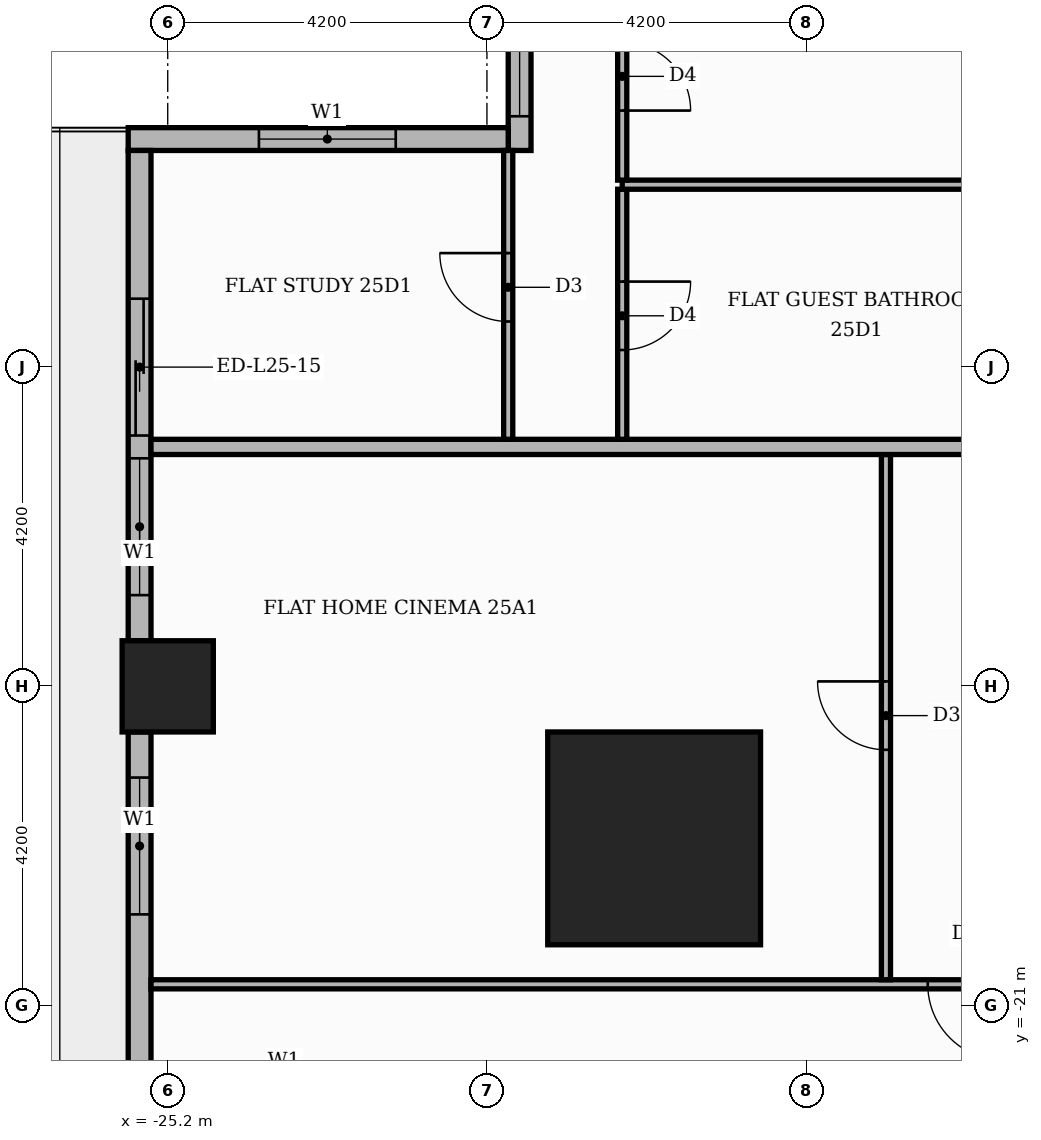
"""IFC4 building model, lengths in metres.
Left out: names, types, materials, properties, quantities, classifications, styles, units other than length and angle.
Written with IfcOpenShell. Run it as: python <this file> out.ifc"""

import sys

from ifc_helpers import new_model, si_unit, direction, frame, frame_2d, origin, origin_2d, place, context, subcontext, project, spatial, rectangle, extrude, element, fill, save


model = new_model("IFC4")
c1 = context("Model", 3, precision=1e-05, world=origin(), true_north=direction((0.0, 1.0)))
c2 = subcontext(c1, "Body", "Model", "MODEL_VIEW")
j1 = project(units=[si_unit("LENGTHUNIT", "METRE"), si_unit("PLANEANGLEUNIT", "RADIAN")], contexts=[c1])
p1 = place(None, origin())
s1 = spatial("IfcSite", under=j1, at=p1, CompositionType="ELEMENT")
p2 = place(p1, origin())
s2 = spatial("IfcBuilding", under=s1, at=p2, CompositionType="ELEMENT")
p3 = place(p2, frame((0.0, 0.0, 106.5)))
s3 = spatial("IfcBuildingStorey", under=s2, at=p3, CompositionType="ELEMENT", Elevation=106.5)
p4 = place(p3, frame((-18.8, -18.8, 0.0), z_axis=(0.0, 0.0, 1.0), x_axis=(1.0, 0.0, 0.0)))
e1 = element("IfcColumn", 1, at=p4, inside=s3, PredefinedType="COLUMN", context=c2, shape_type="SweptSolid", body=[
    extrude(rectangle(XDim=2.8, YDim=2.8, at=origin_2d()), origin(), (0.0, 0.0, 1.0), 3.9),
])
p5 = place(p3, frame((-25.2, -16.8, 0.0), z_axis=(0.0, 0.0, 1.0), x_axis=(1.0, 0.0, 0.0)))
e2 = element("IfcColumn", 2, at=p5, inside=s3, PredefinedType="COLUMN", context=c2, shape_type="SweptSolid", body=[
    extrude(rectangle(XDim=1.2, YDim=1.2, at=origin_2d()), origin(), (0.0, 0.0, 1.0), 3.9),
])
p6 = place(p3, frame((-20.57, 9.45, 0.0), z_axis=(0.0, 0.0, 1.0), x_axis=(0.0, -1.0, 0.0)))
e3 = element("IfcWall", 3, at=p6, inside=s3, PredefinedType="STANDARD", context=c2, shape_type="SweptSolid", body=[
    extrude(rectangle(XDim=19.2, YDim=0.3, at=frame_2d((9.6, 0.0))), origin(), (0.0, 0.0, 1.0), 3.48),
])
p7 = place(p6, frame((0.15, 0.0, 0.9)))
e4 = element("IfcOpeningElement", 4, at=p7, cuts=e3, PredefinedType="OPENING", context=c2, shape_type="SweptSolid", body=[
    extrude(rectangle(XDim=6.0, YDim=2.1, at=frame_2d((3.0, 1.05))), frame((0.0, 0.16, 0.0), z_axis=(0.0, -1.0, 0.0), x_axis=(1.0, 0.0, 0.0)), (0.0, 0.0, 1.0), 0.32),
])
p8 = place(p6, frame((6.45, 0.0, 0.9)))
e5 = element("IfcOpeningElement", 5, at=p8, cuts=e3, PredefinedType="OPENING", context=c2, shape_type="SweptSolid", body=[
    extrude(rectangle(XDim=6.0, YDim=2.1, at=frame_2d((3.0, 1.05))), frame((0.0, 0.16, 0.0), z_axis=(0.0, -1.0, 0.0), x_axis=(1.0, 0.0, 0.0)), (0.0, 0.0, 1.0), 0.32),
])
p9 = place(p6, frame((12.75, 0.0, 0.9)))
e6 = element("IfcOpeningElement", 6, at=p9, cuts=e3, PredefinedType="OPENING", context=c2, shape_type="SweptSolid", body=[
    extrude(rectangle(XDim=6.0, YDim=2.1, at=frame_2d((3.0, 1.05))), frame((0.0, 0.16, 0.0), z_axis=(0.0, -1.0, 0.0), x_axis=(1.0, 0.0, 0.0)), (0.0, 0.0, 1.0), 0.32),
])
p10 = place(p3, frame((-20.72, -9.6, 0.0), z_axis=(0.0, 0.0, 1.0), x_axis=(-1.0, 0.0, 0.0)))
e7 = element("IfcWall", 7, at=p10, inside=s3, PredefinedType="STANDARD", context=c2, shape_type="SweptSolid", body=[
    extrude(rectangle(XDim=5.0, YDim=0.3, at=frame_2d((2.5, 0.0))), origin(), (0.0, 0.0, 1.0), 3.48),
])
p11 = place(p10, frame((1.48, 0.0, 0.9)))
e8 = element("IfcOpeningElement", 8, at=p11, cuts=e7, PredefinedType="OPENING", context=c2, shape_type="SweptSolid", body=[
    extrude(rectangle(XDim=1.8, YDim=2.1, at=frame_2d((0.9, 1.05))), frame((0.0, 0.16, 0.0), z_axis=(0.0, -1.0, 0.0), x_axis=(1.0, 0.0, 0.0)), (0.0, 0.0, 1.0), 0.32),
])
p12 = place(p3, frame((-25.57, -9.75, 0.0), z_axis=(0.0, 0.0, 1.0), x_axis=(0.0, -1.0, 0.0)))
e9 = element("IfcWall", 9, at=p12, inside=s3, PredefinedType="STANDARD", context=c2, shape_type="SweptSolid", body=[
    extrude(rectangle(XDim=6.45, YDim=0.3, at=frame_2d((3.225, 0.0))), origin(), (0.0, 0.0, 1.0), 3.48),
])
p13 = place(p12, frame((1.95, 0.0, 0.0)))
e10 = element("IfcOpeningElement", 10, at=p13, cuts=e9, PredefinedType="OPENING", context=c2, shape_type="SweptSolid", body=[
    extrude(rectangle(XDim=1.8, YDim=2.4, at=frame_2d((0.9, 1.2))), frame((0.0, 0.16, 0.0), z_axis=(0.0, -1.0, 0.0), x_axis=(1.0, 0.0, 0.0)), (0.0, 0.0, 1.0), 0.32),
])
p14 = place(p12, frame((4.05, 0.0, 0.9)))
e11 = element("IfcOpeningElement", 11, at=p14, cuts=e9, PredefinedType="OPENING", context=c2, shape_type="SweptSolid", body=[
    extrude(rectangle(XDim=1.8, YDim=2.1, at=frame_2d((0.9, 1.05))), frame((0.0, 0.16, 0.0), z_axis=(0.0, -1.0, 0.0), x_axis=(1.0, 0.0, 0.0)), (0.0, 0.0, 1.0), 0.32),
])
p15 = place(p3, frame((-25.57, -17.4, 0.0), z_axis=(0.0, 0.0, 1.0), x_axis=(0.0, -1.0, 0.0)))
e12 = element("IfcWall", 12, at=p15, inside=s3, PredefinedType="STANDARD", context=c2, shape_type="SweptSolid", body=[
    extrude(rectangle(XDim=4.82, YDim=0.3, at=frame_2d((2.41, 0.0))), origin(), (0.0, 0.0, 1.0), 3.48),
])
p16 = place(p15, frame((0.6, 0.0, 0.9)))
e13 = element("IfcOpeningElement", 13, at=p16, cuts=e12, PredefinedType="OPENING", context=c2, shape_type="SweptSolid", body=[
    extrude(rectangle(XDim=1.8, YDim=2.1, at=frame_2d((0.9, 1.05))), frame((0.0, 0.16, 0.0), z_axis=(0.0, -1.0, 0.0), x_axis=(1.0, 0.0, 0.0)), (0.0, 0.0, 1.0), 0.32),
])
p17 = place(p3, frame((-25.42, -20.72, 0.0), z_axis=(0.0, 0.0, 1.0), x_axis=(1.0, 0.0, 0.0)))
e14 = element("IfcWall", 14, at=p17, inside=s3, PredefinedType="PARTITIONING", context=c2, shape_type="SweptSolid", body=[
    extrude(rectangle(XDim=38.97, YDim=0.12, at=frame_2d((19.485, 0.0))), origin(), (0.0, 0.0, 1.0), 3.48),
])
p18 = place(p17, frame((10.22, 0.0, 0.0)))
e15 = element("IfcOpeningElement", 15, at=p18, cuts=e14, PredefinedType="OPENING", context=c2, shape_type="SweptSolid", body=[
    extrude(rectangle(XDim=1.0, YDim=2.1, at=frame_2d((0.5, 1.05))), frame((0.0, 0.07, 0.0), z_axis=(0.0, -1.0, 0.0), x_axis=(1.0, 0.0, 0.0)), (0.0, 0.0, 1.0), 0.14),
])
p19 = place(p17, frame((15.47, 0.0, 0.0)))
e16 = element("IfcOpeningElement", 16, at=p19, cuts=e14, PredefinedType="OPENING", context=c2, shape_type="SweptSolid", body=[
    extrude(rectangle(XDim=1.0, YDim=2.1, at=frame_2d((0.5, 1.05))), frame((0.0, 0.07, 0.0), z_axis=(0.0, -1.0, 0.0), x_axis=(1.0, 0.0, 0.0)), (0.0, 0.0, 1.0), 0.14),
])
p20 = place(p17, frame((23.92, 0.0, 0.0)))
e17 = element("IfcOpeningElement", 17, at=p20, cuts=e14, PredefinedType="OPENING", context=c2, shape_type="SweptSolid", body=[
    extrude(rectangle(XDim=0.9, YDim=2.1, at=frame_2d((0.45, 1.05))), frame((0.0, 0.07, 0.0), z_axis=(0.0, -1.0, 0.0), x_axis=(1.0, 0.0, 0.0)), (0.0, 0.0, 1.0), 0.14),
])
p21 = place(p17, frame((34.42, 0.0, 0.0)))
e18 = element("IfcOpeningElement", 18, at=p21, cuts=e14, PredefinedType="OPENING", context=c2, shape_type="SweptSolid", body=[
    extrude(rectangle(XDim=0.9, YDim=2.1, at=frame_2d((0.45, 1.05))), frame((0.0, 0.07, 0.0), z_axis=(0.0, -1.0, 0.0), x_axis=(1.0, 0.0, 0.0)), (0.0, 0.0, 1.0), 0.14),
])
p22 = place(p3, frame((-15.75, -20.66, 0.0), z_axis=(0.0, 0.0, 1.0), x_axis=(0.0, 1.0, 0.0)))
e19 = element("IfcWall", 19, at=p22, inside=s3, PredefinedType="PARTITIONING", context=c2, shape_type="SweptSolid", body=[
    extrude(rectangle(XDim=6.91, YDim=0.12, at=frame_2d((3.455, 0.0))), origin(), (0.0, 0.0, 1.0), 3.48),
])
p23 = place(p22, frame((3.025, 0.0, 0.0)))
e20 = element("IfcOpeningElement", 20, at=p23, cuts=e19, PredefinedType="OPENING", context=c2, shape_type="SweptSolid", body=[
    extrude(rectangle(XDim=0.9, YDim=2.1, at=frame_2d((0.45, 1.05))), frame((0.0, 0.07, 0.0), z_axis=(0.0, -1.0, 0.0), x_axis=(1.0, 0.0, 0.0)), (0.0, 0.0, 1.0), 0.14),
])
p24 = place(p3, frame((-25.42, -13.65, 0.0), z_axis=(0.0, 0.0, 1.0), x_axis=(1.0, 0.0, 0.0)))
e21 = element("IfcWall", 21, at=p24, inside=s3, PredefinedType="PARTITIONING", context=c2, shape_type="SweptSolid", body=[
    extrude(rectangle(XDim=39.07, YDim=0.2, at=frame_2d((19.535, 0.0))), origin(), (0.0, 0.0, 1.0), 3.48),
])
p25 = place(p24, frame((13.32, 0.0, 0.0)))
e22 = element("IfcOpeningElement", 22, at=p25, cuts=e21, PredefinedType="OPENING", context=c2, shape_type="SweptSolid", body=[
    extrude(rectangle(XDim=1.1, YDim=2.4, at=frame_2d((0.55, 1.2))), frame((0.0, 0.11, 0.0), z_axis=(0.0, -1.0, 0.0), x_axis=(1.0, 0.0, 0.0)), (0.0, 0.0, 1.0), 0.22),
])
p26 = place(p3, frame((-20.72, -13.55, 0.0), z_axis=(0.0, 0.0, 1.0), x_axis=(0.0, 1.0, 0.0)))
e23 = element("IfcWall", 23, at=p26, inside=s3, PredefinedType="PARTITIONING", context=c2, shape_type="SweptSolid", body=[
    extrude(rectangle(XDim=3.8, YDim=0.12, at=frame_2d((1.9, 0.0))), origin(), (0.0, 0.0, 1.0), 3.48),
])
p27 = place(p26, frame((1.55, 0.0, 0.0)))
e24 = element("IfcOpeningElement", 24, at=p27, cuts=e23, PredefinedType="OPENING", context=c2, shape_type="SweptSolid", body=[
    extrude(rectangle(XDim=0.9, YDim=2.1, at=frame_2d((0.45, 1.05))), frame((0.0, 0.07, 0.0), z_axis=(0.0, -1.0, 0.0), x_axis=(1.0, 0.0, 0.0)), (0.0, 0.0, 1.0), 0.14),
])
p28 = place(p3, frame((-19.22, -13.55, 0.0), z_axis=(0.0, 0.0, 1.0), x_axis=(0.0, 1.0, 0.0)))
e25 = element("IfcWall", 25, at=p28, inside=s3, PredefinedType="PARTITIONING", context=c2, shape_type="SweptSolid", body=[
    extrude(rectangle(XDim=3.29, YDim=0.12, at=frame_2d((1.645, 0.0))), origin(), (0.0, 0.0, 1.0), 3.48),
])
p29 = place(p28, frame((1.175, 0.0, 0.0)))
e26 = element("IfcOpeningElement", 26, at=p29, cuts=e25, PredefinedType="OPENING", context=c2, shape_type="SweptSolid", body=[
    extrude(rectangle(XDim=0.9, YDim=2.1, at=frame_2d((0.45, 1.05))), frame((0.0, 0.07, 0.0), z_axis=(0.0, -1.0, 0.0), x_axis=(1.0, 0.0, 0.0)), (0.0, 0.0, 1.0), 0.14),
])
p30 = place(p3, frame((-19.22, -10.2, 0.0), z_axis=(0.0, 0.0, 1.0), x_axis=(1.0, 0.0, 0.0)))
e27 = element("IfcWall", 27, at=p30, inside=s3, PredefinedType="PARTITIONING", context=c2, shape_type="SweptSolid", body=[
    extrude(rectangle(XDim=5.47, YDim=0.12, at=frame_2d((2.735, 0.0))), origin(), (0.0, 0.0, 1.0), 3.48),
])
p31 = place(p3, frame((-19.22, -10.14, 0.0), z_axis=(0.0, 0.0, 1.0), x_axis=(0.0, 1.0, 0.0)))
e28 = element("IfcWall", 28, at=p31, inside=s3, PredefinedType="PARTITIONING", context=c2, shape_type="SweptSolid", body=[
    extrude(rectangle(XDim=2.73, YDim=0.12, at=frame_2d((1.365, 0.0))), origin(), (0.0, 0.0, 1.0), 3.48),
])
p32 = place(p31, frame((0.915, 0.0, 0.0)))
e29 = element("IfcOpeningElement", 29, at=p32, cuts=e28, PredefinedType="OPENING", context=c2, shape_type="SweptSolid", body=[
    extrude(rectangle(XDim=0.9, YDim=2.1, at=frame_2d((0.45, 1.05))), frame((0.0, 0.07, 0.0), z_axis=(0.0, -1.0, 0.0), x_axis=(1.0, 0.0, 0.0)), (0.0, 0.0, 1.0), 0.14),
])
p33 = place(p9, origin())
e30 = element("IfcWindow", 30, at=p33, inside=s3, PartitioningType="SINGLE_PANEL", PredefinedType="WINDOW", context=c2, shape_type="SweptSolid", body=[
    extrude(rectangle(XDim=6.0, YDim=2.1, at=frame_2d((3.0, 1.05))), frame((0.0, 0.03, 0.0), z_axis=(0.0, -1.0, 0.0), x_axis=(1.0, 0.0, 0.0)), (0.0, 0.0, 1.0), 0.06),
])
fill(e6, e30)
p34 = place(p11, origin())
e31 = element("IfcWindow", 31, at=p34, inside=s3, PartitioningType="SINGLE_PANEL", PredefinedType="WINDOW", context=c2, shape_type="SweptSolid", body=[
    extrude(rectangle(XDim=1.8, YDim=2.1, at=frame_2d((0.9, 1.05))), frame((0.0, 0.03, 0.0), z_axis=(0.0, -1.0, 0.0), x_axis=(1.0, 0.0, 0.0)), (0.0, 0.0, 1.0), 0.06),
])
fill(e8, e31)
p35 = place(p13, origin())
e32 = element("IfcDoor", 32, at=p35, inside=s3, OperationType="SLIDING_TO_RIGHT", PredefinedType="DOOR", context=c2, shape_type="SweptSolid", body=[
    extrude(rectangle(XDim=1.8, YDim=2.4, at=frame_2d((0.9, 1.2))), frame((0.0, 0.025, 0.0), z_axis=(0.0, -1.0, 0.0), x_axis=(1.0, 0.0, 0.0)), (0.0, 0.0, 1.0), 0.05),
])
fill(e10, e32)
p36 = place(p14, origin())
e33 = element("IfcWindow", 33, at=p36, inside=s3, PartitioningType="SINGLE_PANEL", PredefinedType="WINDOW", context=c2, shape_type="SweptSolid", body=[
    extrude(rectangle(XDim=1.8, YDim=2.1, at=frame_2d((0.9, 1.05))), frame((0.0, 0.03, 0.0), z_axis=(0.0, -1.0, 0.0), x_axis=(1.0, 0.0, 0.0)), (0.0, 0.0, 1.0), 0.06),
])
fill(e11, e33)
p37 = place(p16, origin())
e34 = element("IfcWindow", 34, at=p37, inside=s3, PartitioningType="SINGLE_PANEL", PredefinedType="WINDOW", context=c2, shape_type="SweptSolid", body=[
    extrude(rectangle(XDim=1.8, YDim=2.1, at=frame_2d((0.9, 1.05))), frame((0.0, 0.03, 0.0), z_axis=(0.0, -1.0, 0.0), x_axis=(1.0, 0.0, 0.0)), (0.0, 0.0, 1.0), 0.06),
])
fill(e13, e34)
p38 = place(p23, origin())
e35 = element("IfcDoor", 35, at=p38, inside=s3, OperationType="SINGLE_SWING_RIGHT", PredefinedType="DOOR", context=c2, shape_type="SweptSolid", body=[
    extrude(rectangle(XDim=0.9, YDim=2.1, at=frame_2d((0.45, 1.05))), frame((0.0, 0.025, 0.0), z_axis=(0.0, -1.0, 0.0), x_axis=(1.0, 0.0, 0.0)), (0.0, 0.0, 1.0), 0.05),
])
fill(e20, e35)
p39 = place(p18, frame((1.0, 0.0, 0.0), z_axis=(0.0, 0.0, 1.0), x_axis=(-1.0, 0.0, 0.0)))
e36 = element("IfcDoor", 36, at=p39, inside=s3, OperationType="SINGLE_SWING_RIGHT", PredefinedType="DOOR", context=c2, shape_type="SweptSolid", body=[
    extrude(rectangle(XDim=1.0, YDim=2.1, at=frame_2d((0.5, 1.05))), frame((0.0, 0.025, 0.0), z_axis=(0.0, -1.0, 0.0), x_axis=(1.0, 0.0, 0.0)), (0.0, 0.0, 1.0), 0.05),
])
fill(e15, e36)
p40 = place(p32, frame((0.9, 0.0, 0.0), z_axis=(0.0, 0.0, 1.0), x_axis=(-1.0, 0.0, 0.0)))
e37 = element("IfcDoor", 37, at=p40, inside=s3, OperationType="SINGLE_SWING_LEFT", PredefinedType="DOOR", context=c2, shape_type="SweptSolid", body=[
    extrude(rectangle(XDim=0.9, YDim=2.1, at=frame_2d((0.45, 1.05))), frame((0.0, 0.025, 0.0), z_axis=(0.0, -1.0, 0.0), x_axis=(1.0, 0.0, 0.0)), (0.0, 0.0, 1.0), 0.05),
])
fill(e29, e37)
p41 = place(p29, frame((0.9, 0.0, 0.0), z_axis=(0.0, 0.0, 1.0), x_axis=(-1.0, 0.0, 0.0)))
e38 = element("IfcDoor", 38, at=p41, inside=s3, OperationType="SINGLE_SWING_RIGHT", PredefinedType="DOOR", context=c2, shape_type="SweptSolid", body=[
    extrude(rectangle(XDim=0.9, YDim=2.1, at=frame_2d((0.45, 1.05))), frame((0.0, 0.025, 0.0), z_axis=(0.0, -1.0, 0.0), x_axis=(1.0, 0.0, 0.0)), (0.0, 0.0, 1.0), 0.05),
])
fill(e26, e38)
p42 = place(p27, origin())
e39 = element("IfcDoor", 39, at=p42, inside=s3, OperationType="SINGLE_SWING_RIGHT", PredefinedType="DOOR", context=c2, shape_type="SweptSolid", body=[
    extrude(rectangle(XDim=0.9, YDim=2.1, at=frame_2d((0.45, 1.05))), frame((0.0, 0.025, 0.0), z_axis=(0.0, -1.0, 0.0), x_axis=(1.0, 0.0, 0.0)), (0.0, 0.0, 1.0), 0.05),
])
fill(e24, e39)
save(model, sys.argv[1])
